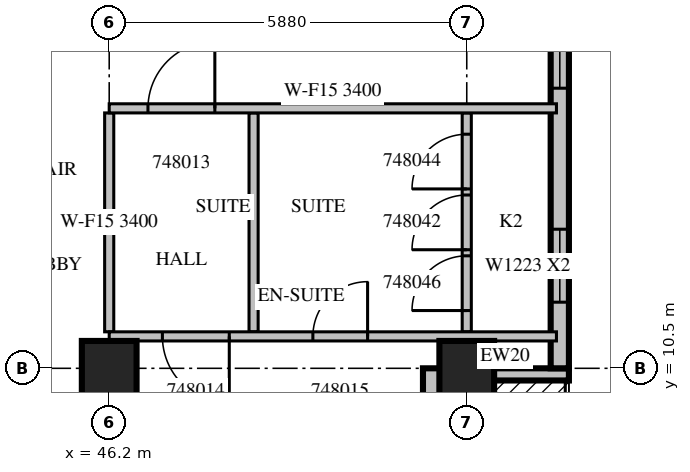
"""IFC4 building model, lengths in metres.
Left out: names, types, materials, properties, quantities, classifications, styles, units other than length and angle.
Written with IfcOpenShell. Run it as: python <this file> out.ifc"""

import sys

from ifc_helpers import new_model, si_unit, direction, frame, frame_2d, origin, origin_2d, place, context, subcontext, project, spatial, rectangle, extrude, source, transform, mapped, element, fill, save


model = new_model("IFC4")
c1 = context("Model", 3, precision=1e-05, world=origin(), true_north=direction((0.0, 1.0)))
c2 = subcontext(c1, "Body", "Model", "MODEL_VIEW")
j1 = project(units=[si_unit("LENGTHUNIT", "METRE"), si_unit("PLANEANGLEUNIT", "RADIAN")], contexts=[c1])
p1 = place(None, origin())
s1 = spatial("IfcSite", under=j1, at=p1, CompositionType="ELEMENT")
p2 = place(p1, origin())
s2 = spatial("IfcBuilding", under=s1, at=p2, CompositionType="ELEMENT")
p3 = place(p2, frame((0.0, 0.0, 215.8)))
s3 = spatial("IfcBuildingStorey", under=s2, at=p3, CompositionType="ELEMENT", Elevation=215.8)
m1 = source(origin(), c2, "Body", "SweptSolid", [
    extrude(rectangle(XDim=0.9, YDim=0.9, at=origin_2d()), origin(), (0.0, 0.0, 1.0), 3.8),
])
for number, where, z_axis, x_axis in (
    (1, (46.2, 10.5, 0.0), (0.0, 0.0, 1.0), (1.0, 0.0, 0.0)),
    (2, (52.08, 10.5, 0.0), (0.0, 0.0, 1.0), (1.0, 0.0, 0.0)),
):
    element("IfcColumn", number, at=place(p3, frame(where, z_axis=z_axis, x_axis=x_axis)), inside=s3, PredefinedType="COLUMN", context=c2, shape_type="MappedRepresentation", body=[
        mapped(m1, transform((0.0, 0.0, 0.0), scale=1.0)),
    ])
m2 = source(origin(), c2, "Body", "SweptSolid", [
    extrude(rectangle(XDim=3.15, YDim=0.3, at=frame_2d((1.575, 0.0))), origin(), (0.0, 0.0, 1.0), 3.4),
])
p4 = place(p3, frame((51.51, 7.35, 0.0), z_axis=(0.0, 0.0, 1.0), x_axis=(0.0, 1.0, 0.0)))
e3 = element("IfcWall", 3, at=p4, inside=s3, PredefinedType="STANDARD", context=c2, shape_type="MappedRepresentation", body=[
    mapped(m2, transform((0.0, 0.0, 0.0), scale=1.0)),
])
m3 = source(origin(), c2, "Body", "SweptSolid", [
    extrude(rectangle(XDim=1.8, YDim=2.4, at=frame_2d((0.9, 1.2))), frame((0.0, 0.16, 0.0), z_axis=(0.0, -1.0, 0.0), x_axis=(1.0, 0.0, 0.0)), (0.0, 0.0, 1.0), 0.32),
])
p5 = place(p4, frame((0.675, 0.0, 0.0)))
e4 = element("IfcOpeningElement", 4, at=p5, cuts=e3, PredefinedType="OPENING", context=c2, shape_type="MappedRepresentation", body=[
    mapped(m3, transform((0.0, 0.0, 0.0), scale=1.0)),
])
m4 = source(origin(), c2, "Body", "SweptSolid", [
    extrude(rectangle(XDim=2.1, YDim=0.2, at=frame_2d((1.05, 0.0))), origin(), (0.0, 0.0, 1.0), 3.4),
])
p6 = place(p3, frame((53.76, 10.4, 0.0), z_axis=(0.0, 0.0, 1.0), x_axis=(-1.0, 0.0, 0.0)))
e5 = element("IfcWall", 5, at=p6, inside=s3, PredefinedType="STANDARD", context=c2, shape_type="MappedRepresentation", body=[
    mapped(m4, transform((0.0, 0.0, 0.0), scale=1.0)),
])
m5 = source(origin(), c2, "Body", "SweptSolid", [
    extrude(rectangle(XDim=6.75, YDim=0.3, at=frame_2d((3.375, 0.0))), origin(), (0.0, 0.0, 1.0), 3.4),
])
p7 = place(p3, frame((53.61, 10.5, 0.0), z_axis=(0.0, 0.0, 1.0), x_axis=(0.0, 1.0, 0.0)))
e6 = element("IfcWall", 6, at=p7, inside=s3, PredefinedType="STANDARD", context=c2, shape_type="MappedRepresentation", body=[
    mapped(m5, transform((0.0, 0.0, 0.0), scale=1.0)),
])
m6 = source(origin(), c2, "Body", "SweptSolid", [
    extrude(rectangle(XDim=1.2, YDim=2.3, at=frame_2d((0.6, 1.15))), frame((0.0, 0.16, 0.0), z_axis=(0.0, -1.0, 0.0), x_axis=(1.0, 0.0, 0.0)), (0.0, 0.0, 1.0), 0.32),
])
p8 = place(p7, frame((1.087, 0.0, 0.6)))
e7 = element("IfcOpeningElement", 7, at=p8, cuts=e6, PredefinedType="OPENING", context=c2, shape_type="MappedRepresentation", body=[
    mapped(m6, transform((0.0, 0.0, 0.0), scale=1.0)),
])
p9 = place(p7, frame((4.606, 0.0, 0.6)))
e8 = element("IfcOpeningElement", 8, at=p9, cuts=e6, PredefinedType="OPENING", context=c2, shape_type="MappedRepresentation", body=[
    mapped(m6, transform((0.0, 0.0, 0.0), scale=1.0)),
])
m7 = source(origin(), c2, "Body", "SweptSolid", [
    extrude(rectangle(XDim=3.6, YDim=0.15, at=frame_2d((1.8, 0.0))), origin(), (0.0, 0.0, 1.0), 3.4),
])
p10 = place(p3, frame((48.574, 11.1, 0.0), z_axis=(0.0, 0.0, 1.0), x_axis=(0.0, 1.0, 0.0)))
e9 = element("IfcWall", 9, at=p10, inside=s3, PredefinedType="PARTITIONING", context=c2, shape_type="MappedRepresentation", body=[
    mapped(m7, transform((0.0, 0.0, 0.0), scale=1.0)),
])
p11 = place(p3, frame((52.08, 11.1, 0.0), z_axis=(0.0, 0.0, 1.0), x_axis=(0.0, 1.0, 0.0)))
e10 = element("IfcWall", 10, at=p11, inside=s3, PredefinedType="PARTITIONING", context=c2, shape_type="MappedRepresentation", body=[
    mapped(m7, transform((0.0, 0.0, 0.0), scale=1.0)),
])
m8 = source(origin(), c2, "Body", "SweptSolid", [
    extrude(rectangle(XDim=0.9, YDim=2.1, at=frame_2d((0.45, 1.05))), frame((0.0, 0.085, 0.0), z_axis=(0.0, -1.0, 0.0), x_axis=(1.0, 0.0, 0.0)), (0.0, 0.0, 1.0), 0.17),
])
p12 = place(p11, frame((1.35, 0.0, 0.0)))
e11 = element("IfcOpeningElement", 11, at=p12, cuts=e10, PredefinedType="OPENING", context=c2, shape_type="MappedRepresentation", body=[
    mapped(m8, transform((0.0, 0.0, 0.0), scale=1.0)),
])
p13 = place(p11, frame((2.35, 0.0, 0.0)))
e12 = element("IfcOpeningElement", 12, at=p13, cuts=e10, PredefinedType="OPENING", context=c2, shape_type="MappedRepresentation", body=[
    mapped(m8, transform((0.0, 0.0, 0.0), scale=1.0)),
])
p14 = place(p11, frame((0.35, 0.0, 0.0)))
e13 = element("IfcOpeningElement", 13, at=p14, cuts=e10, PredefinedType="OPENING", context=c2, shape_type="MappedRepresentation", body=[
    mapped(m8, transform((0.0, 0.0, 0.0), scale=1.0)),
])
p15 = place(p3, frame((46.2, 11.1, 0.0), z_axis=(0.0, 0.0, 1.0), x_axis=(0.0, 1.0, 0.0)))
e14 = element("IfcWall", 14, at=p15, inside=s3, PredefinedType="PARTITIONING", context=c2, shape_type="MappedRepresentation", body=[
    mapped(m7, transform((0.0, 0.0, 0.0), scale=1.0)),
])
m9 = source(origin(), c2, "Body", "SweptSolid", [
    extrude(rectangle(XDim=7.355, YDim=0.15, at=frame_2d((3.678, 0.0))), origin(), (0.0, 0.0, 1.0), 3.4),
])
p16 = place(p3, frame((53.555, 11.025, 0.0), z_axis=(0.0, 0.0, 1.0), x_axis=(-1.0, 0.0, 0.0)))
e15 = element("IfcWall", 15, at=p16, inside=s3, PredefinedType="PARTITIONING", context=c2, shape_type="MappedRepresentation", body=[
    mapped(m9, transform((0.0, 0.0, 0.0), scale=1.0)),
])
m10 = source(origin(), c2, "Body", "SweptSolid", [
    extrude(rectangle(XDim=1.1, YDim=2.1, at=frame_2d((0.55, 1.05))), frame((0.0, 0.085, 0.0), z_axis=(0.0, -1.0, 0.0), x_axis=(1.0, 0.0, 0.0)), (0.0, 0.0, 1.0), 0.17),
])
p17 = place(p16, frame((5.38, 0.0, 0.0)))
e16 = element("IfcOpeningElement", 16, at=p17, cuts=e15, PredefinedType="OPENING", context=c2, shape_type="MappedRepresentation", body=[
    mapped(m10, transform((0.0, 0.0, 0.0), scale=1.0)),
])
p18 = place(p16, frame((3.106, 0.0, 0.0)))
e17 = element("IfcOpeningElement", 17, at=p18, cuts=e15, PredefinedType="OPENING", context=c2, shape_type="MappedRepresentation", body=[
    mapped(m8, transform((0.0, 0.0, 0.0), scale=1.0)),
])
p19 = place(p3, frame((53.555, 14.775, 0.0), z_axis=(0.0, 0.0, 1.0), x_axis=(-1.0, 0.0, 0.0)))
e18 = element("IfcWall", 18, at=p19, inside=s3, PredefinedType="PARTITIONING", context=c2, shape_type="MappedRepresentation", body=[
    mapped(m9, transform((0.0, 0.0, 0.0), scale=1.0)),
])
p20 = place(p19, frame((5.618, 0.0, 0.0)))
e19 = element("IfcOpeningElement", 19, at=p20, cuts=e18, PredefinedType="OPENING", context=c2, shape_type="MappedRepresentation", body=[
    mapped(m10, transform((0.0, 0.0, 0.0), scale=1.0)),
])
m11 = source(origin(), c2, "Body", "SweptSolid", [
    extrude(rectangle(XDim=1.2, YDim=2.3, at=frame_2d((0.6, 1.15))), frame((0.0, 0.03, 0.0), z_axis=(0.0, -1.0, 0.0), x_axis=(1.0, 0.0, 0.0)), (0.0, 0.0, 1.0), 0.06),
])
p21 = place(p8, origin())
e20 = element("IfcWindow", 20, at=p21, inside=s3, PartitioningType="SINGLE_PANEL", PredefinedType="WINDOW", context=c2, shape_type="MappedRepresentation", body=[
    mapped(m11, transform((0.0, 0.0, 0.0), scale=1.0)),
])
fill(e7, e20)
p22 = place(p9, origin())
e21 = element("IfcWindow", 21, at=p22, inside=s3, PartitioningType="SINGLE_PANEL", PredefinedType="WINDOW", context=c2, shape_type="MappedRepresentation", body=[
    mapped(m11, transform((0.0, 0.0, 0.0), scale=1.0)),
])
fill(e8, e21)
m12 = source(origin(), c2, "Body", "SweptSolid", [
    extrude(rectangle(XDim=1.1, YDim=2.1, at=frame_2d((0.55, 1.05))), frame((0.0, 0.025, 0.0), z_axis=(0.0, -1.0, 0.0), x_axis=(1.0, 0.0, 0.0)), (0.0, 0.0, 1.0), 0.05),
])
p23 = place(p20, origin())
e22 = element("IfcDoor", 22, at=p23, inside=s3, OperationType="SINGLE_SWING_RIGHT", PredefinedType="DOOR", context=c2, shape_type="MappedRepresentation", body=[
    mapped(m12, transform((0.0, 0.0, 0.0), scale=1.0)),
])
fill(e19, e22)
p24 = place(p17, origin())
e23 = element("IfcDoor", 23, at=p24, inside=s3, OperationType="SINGLE_SWING_LEFT", PredefinedType="DOOR", context=c2, shape_type="MappedRepresentation", body=[
    mapped(m12, transform((0.0, 0.0, 0.0), scale=1.0)),
])
fill(e16, e23)
m13 = source(origin(), c2, "Body", "SweptSolid", [
    extrude(rectangle(XDim=0.9, YDim=2.1, at=frame_2d((0.45, 1.05))), frame((0.0, 0.025, 0.0), z_axis=(0.0, -1.0, 0.0), x_axis=(1.0, 0.0, 0.0)), (0.0, 0.0, 1.0), 0.05),
])
p25 = place(p18, origin())
e24 = element("IfcDoor", 24, at=p25, inside=s3, OperationType="SINGLE_SWING_RIGHT", PredefinedType="DOOR", context=c2, shape_type="MappedRepresentation", body=[
    mapped(m13, transform((0.0, 0.0, 0.0), scale=1.0)),
])
fill(e17, e24)
p26 = place(p12, origin())
e25 = element("IfcDoor", 25, at=p26, inside=s3, OperationType="SINGLE_SWING_LEFT", PredefinedType="DOOR", context=c2, shape_type="MappedRepresentation", body=[
    mapped(m13, transform((0.0, 0.0, 0.0), scale=1.0)),
])
fill(e11, e25)
p27 = place(p13, origin())
e26 = element("IfcDoor", 26, at=p27, inside=s3, OperationType="SINGLE_SWING_LEFT", PredefinedType="DOOR", context=c2, shape_type="MappedRepresentation", body=[
    mapped(m13, transform((0.0, 0.0, 0.0), scale=1.0)),
])
fill(e12, e26)
p28 = place(p14, origin())
e27 = element("IfcDoor", 27, at=p28, inside=s3, OperationType="SINGLE_SWING_LEFT", PredefinedType="DOOR", context=c2, shape_type="MappedRepresentation", body=[
    mapped(m13, transform((0.0, 0.0, 0.0), scale=1.0)),
])
fill(e13, e27)
save(model, sys.argv[1])
